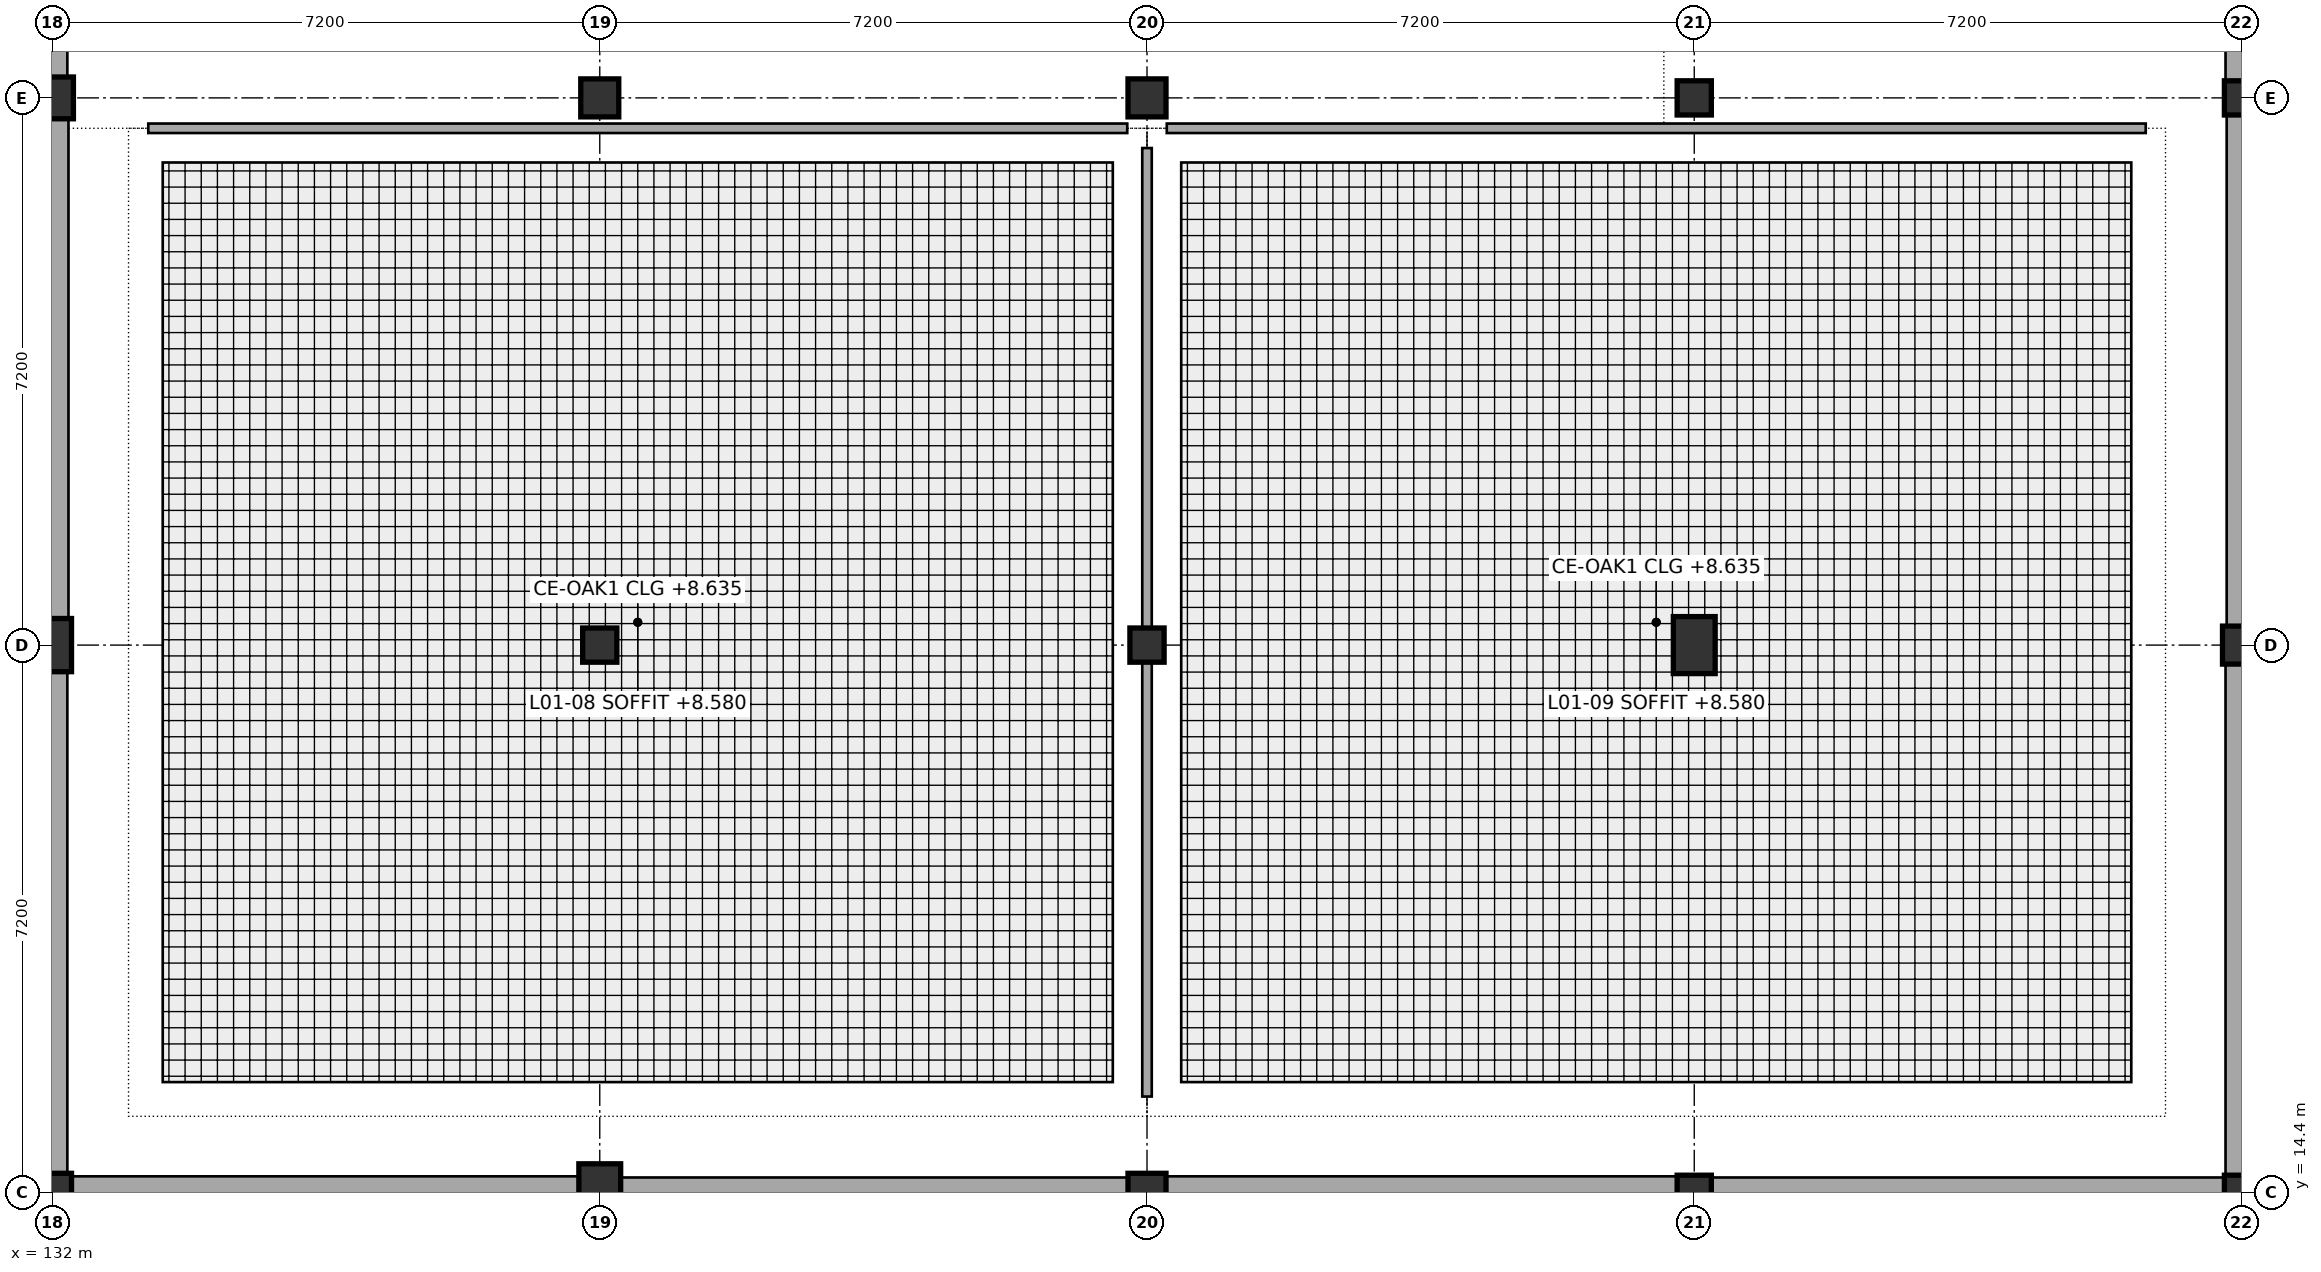
"""IFC4 building model, lengths in metres.
Left out: names, types, materials, properties, quantities, classifications, styles, units other than length and angle.
Written with IfcOpenShell. Run it as: python <this file> out.ifc"""

import sys

from ifc_helpers import new_model, si_unit, direction, frame, frame_2d, origin, origin_2d, place, context, subcontext, project, spatial, rectangle, circle, extrude, element, fill, save


model = new_model("IFC4")
c1 = context("Model", 3, precision=1e-05, world=origin(), true_north=direction((0.0, 1.0)))
c2 = subcontext(c1, "Body", "Model", "MODEL_VIEW")
j1 = project(units=[si_unit("LENGTHUNIT", "METRE"), si_unit("PLANEANGLEUNIT", "RADIAN")], contexts=[c1])
p1 = place(None, origin())
s1 = spatial("IfcSite", under=j1, at=p1, CompositionType="ELEMENT")
p2 = place(p1, origin())
s2 = spatial("IfcBuilding", under=s1, at=p2, CompositionType="ELEMENT")
p3 = place(p2, frame((0.0, 0.0, 4.8)))
s3 = spatial("IfcBuildingStorey", under=s2, at=p3, CompositionType="ELEMENT", Elevation=4.8)
p4 = place(p3, frame((132.0, 14.4, 0.0), z_axis=(0.0, 0.0, 1.0), x_axis=(1.0, 0.0, 0.0)))
e1 = element("IfcColumn", 1, at=p4, inside=s3, PredefinedType="COLUMN", context=c2, shape_type="SweptSolid", body=[
    extrude(rectangle(XDim=0.5, YDim=0.5, at=origin_2d()), origin(), (0.0, 0.0, 1.0), 4.2),
])
p5 = place(p3, frame((132.0, 21.6, 0.0), z_axis=(0.0, 0.0, 1.0), x_axis=(1.0, 0.0, 0.0)))
e2 = element("IfcColumn", 2, at=p5, inside=s3, PredefinedType="COLUMN", context=c2, shape_type="SweptSolid", body=[
    extrude(rectangle(XDim=0.5, YDim=0.7, at=origin_2d()), origin(), (0.0, 0.0, 1.0), 4.2),
])
p6 = place(p3, frame((132.0, 28.8, 0.0), z_axis=(0.0, 0.0, 1.0), x_axis=(1.0, 0.0, 0.0)))
e3 = element("IfcColumn", 3, at=p6, inside=s3, PredefinedType="COLUMN", context=c2, shape_type="SweptSolid", body=[
    extrude(circle(Radius=0.275, at=origin_2d()), origin(), (0.0, 0.0, 1.0), 4.2),
])
p7 = place(p3, frame((139.2, 14.4, 0.0), z_axis=(0.0, 0.0, 1.0), x_axis=(1.0, 0.0, 0.0)))
e4 = element("IfcColumn", 4, at=p7, inside=s3, PredefinedType="COLUMN", context=c2, shape_type="SweptSolid", body=[
    extrude(rectangle(XDim=0.55, YDim=0.75, at=origin_2d()), origin(), (0.0, 0.0, 1.0), 4.2),
])
p8 = place(p3, frame((139.2, 21.6, 0.0), z_axis=(0.0, 0.0, 1.0), x_axis=(1.0, 0.0, 0.0)))
e5 = element("IfcColumn", 5, at=p8, inside=s3, PredefinedType="COLUMN", context=c2, shape_type="SweptSolid", body=[
    extrude(rectangle(XDim=0.45, YDim=0.45, at=origin_2d()), origin(), (0.0, 0.0, 1.0), 4.2),
])
for number, where, z_axis, x_axis in (
    (6, (139.2, 28.8, 0.0), (0.0, 0.0, 1.0), (1.0, 0.0, 0.0)),
    (7, (146.4, 14.4, 0.0), (0.0, 0.0, 1.0), (1.0, 0.0, 0.0)),
):
    element("IfcColumn", number, at=place(p3, frame(where, z_axis=z_axis, x_axis=x_axis)), inside=s3, PredefinedType="COLUMN", context=c2, shape_type="SweptSolid", body=[
        extrude(rectangle(XDim=0.5, YDim=0.5, at=origin_2d()), origin(), (0.0, 0.0, 1.0), 4.2),
    ])
p9 = place(p3, frame((146.4, 21.6, 0.0), z_axis=(0.0, 0.0, 1.0), x_axis=(1.0, 0.0, 0.0)))
e8 = element("IfcColumn", 8, at=p9, inside=s3, PredefinedType="COLUMN", context=c2, shape_type="SweptSolid", body=[
    extrude(rectangle(XDim=0.45, YDim=0.45, at=origin_2d()), origin(), (0.0, 0.0, 1.0), 4.2),
])
p10 = place(p3, frame((146.4, 28.8, 0.0), z_axis=(0.0, 0.0, 1.0), x_axis=(1.0, 0.0, 0.0)))
e9 = element("IfcColumn", 9, at=p10, inside=s3, PredefinedType="COLUMN", context=c2, shape_type="SweptSolid", body=[
    extrude(rectangle(XDim=0.5, YDim=0.5, at=origin_2d()), origin(), (0.0, 0.0, 1.0), 4.2),
])
p11 = place(p3, frame((153.6, 14.4, 0.0), z_axis=(0.0, 0.0, 1.0), x_axis=(1.0, 0.0, 0.0)))
e10 = element("IfcColumn", 10, at=p11, inside=s3, PredefinedType="COLUMN", context=c2, shape_type="SweptSolid", body=[
    extrude(rectangle(XDim=0.45, YDim=0.45, at=origin_2d()), origin(), (0.0, 0.0, 1.0), 4.2),
])
p12 = place(p3, frame((153.6, 21.6, 0.0), z_axis=(0.0, 0.0, 1.0), x_axis=(1.0, 0.0, 0.0)))
e11 = element("IfcColumn", 11, at=p12, inside=s3, PredefinedType="COLUMN", context=c2, shape_type="SweptSolid", body=[
    extrude(rectangle(XDim=0.55, YDim=0.75, at=origin_2d()), origin(), (0.0, 0.0, 1.0), 4.2),
])
for number, where, z_axis, x_axis in (
    (12, (153.6, 28.8, 0.0), (0.0, 0.0, 1.0), (1.0, 0.0, 0.0)),
    (13, (160.8, 14.4, 0.0), (0.0, 0.0, 1.0), (1.0, 0.0, 0.0)),
):
    element("IfcColumn", number, at=place(p3, frame(where, z_axis=z_axis, x_axis=x_axis)), inside=s3, PredefinedType="COLUMN", context=c2, shape_type="SweptSolid", body=[
        extrude(rectangle(XDim=0.45, YDim=0.45, at=origin_2d()), origin(), (0.0, 0.0, 1.0), 4.2),
    ])
p13 = place(p3, frame((160.8, 21.6, 0.0), z_axis=(0.0, 0.0, 1.0), x_axis=(1.0, 0.0, 0.0)))
e14 = element("IfcColumn", 14, at=p13, inside=s3, PredefinedType="COLUMN", context=c2, shape_type="SweptSolid", body=[
    extrude(rectangle(XDim=0.5, YDim=0.5, at=origin_2d()), origin(), (0.0, 0.0, 1.0), 4.2),
])
p14 = place(p3, frame((160.8, 28.8, 0.0), z_axis=(0.0, 0.0, 1.0), x_axis=(1.0, 0.0, 0.0)))
e15 = element("IfcColumn", 15, at=p14, inside=s3, PredefinedType="COLUMN", context=c2, shape_type="SweptSolid", body=[
    extrude(rectangle(XDim=0.45, YDim=0.45, at=origin_2d()), origin(), (0.0, 0.0, 1.0), 4.2),
])
p15 = place(p3, frame((160.8, 36.0, 0.0), z_axis=(0.0, 0.0, 1.0), x_axis=(0.0, -1.0, 0.0)))
e16 = element("IfcWall", 16, at=p15, inside=s3, PredefinedType="STANDARD", context=c2, shape_type="SweptSolid", body=[
    extrude(rectangle(XDim=7.2, YDim=0.42, at=frame_2d((3.6, 0.0))), origin(), (0.0, 0.0, 1.0), 3.84),
])
p16 = place(p15, frame((3.0, 0.0, 0.8)))
e17 = element("IfcOpeningElement", 17, at=p16, cuts=e16, PredefinedType="OPENING", context=c2, shape_type="SweptSolid", body=[
    extrude(rectangle(XDim=1.2, YDim=1.45, at=frame_2d((0.6, 0.725))), frame((0.0, 0.22, 0.0), z_axis=(0.0, -1.0, 0.0), x_axis=(1.0, 0.0, 0.0)), (0.0, 0.0, 1.0), 0.44),
])
p17 = place(p3, frame((160.8, 28.8, 0.0), z_axis=(0.0, 0.0, 1.0), x_axis=(0.0, -1.0, 0.0)))
e18 = element("IfcWall", 18, at=p17, inside=s3, PredefinedType="STANDARD", context=c2, shape_type="SweptSolid", body=[
    extrude(rectangle(XDim=7.2, YDim=0.39, at=frame_2d((3.6, 0.0))), origin(), (0.0, 0.0, 1.0), 2.94),
])
p18 = place(p17, frame((2.85, 0.0, 0.8)))
e19 = element("IfcOpeningElement", 19, at=p18, cuts=e18, PredefinedType="OPENING", context=c2, shape_type="SweptSolid", body=[
    extrude(rectangle(XDim=1.5, YDim=1.45, at=frame_2d((0.75, 0.725))), frame((0.0, 0.205, 0.0), z_axis=(0.0, -1.0, 0.0), x_axis=(1.0, 0.0, 0.0)), (0.0, 0.0, 1.0), 0.41),
])
p19 = place(p3, frame((160.8, 21.6, 0.0), z_axis=(0.0, 0.0, 1.0), x_axis=(0.0, -1.0, 0.0)))
e20 = element("IfcWall", 20, at=p19, inside=s3, PredefinedType="STANDARD", context=c2, shape_type="SweptSolid", body=[
    extrude(rectangle(XDim=7.2, YDim=0.42, at=frame_2d((3.6, 0.0))), origin(), (0.0, 0.0, 1.0), 3.84),
])
p20 = place(p19, frame((2.7, 0.0, 0.8)))
e21 = element("IfcOpeningElement", 21, at=p20, cuts=e20, PredefinedType="OPENING", context=c2, shape_type="SweptSolid", body=[
    extrude(rectangle(XDim=1.8, YDim=1.45, at=frame_2d((0.9, 0.725))), frame((0.0, 0.22, 0.0), z_axis=(0.0, -1.0, 0.0), x_axis=(1.0, 0.0, 0.0)), (0.0, 0.0, 1.0), 0.44),
])
p21 = place(p3, frame((160.8, 14.4, 0.0), z_axis=(0.0, 0.0, 1.0), x_axis=(-1.0, 0.0, 0.0)))
e22 = element("IfcWall", 22, at=p21, inside=s3, PredefinedType="STANDARD", context=c2, shape_type="SweptSolid", body=[
    extrude(rectangle(XDim=7.2, YDim=0.39, at=frame_2d((3.6, 0.0))), origin(), (0.0, 0.0, 1.0), 3.04),
])
p22 = place(p21, frame((2.8, 0.0, 0.0)))
e23 = element("IfcOpeningElement", 23, at=p22, cuts=e22, PredefinedType="OPENING", context=c2, shape_type="SweptSolid", body=[
    extrude(rectangle(XDim=1.6, YDim=2.2, at=frame_2d((0.8, 1.1))), frame((0.0, 0.205, 0.0), z_axis=(0.0, -1.0, 0.0), x_axis=(1.0, 0.0, 0.0)), (0.0, 0.0, 1.0), 0.41),
])
p23 = place(p3, frame((153.6, 14.4, 0.0), z_axis=(0.0, 0.0, 1.0), x_axis=(-1.0, 0.0, 0.0)))
e24 = element("IfcWall", 24, at=p23, inside=s3, PredefinedType="STANDARD", context=c2, shape_type="SweptSolid", body=[
    extrude(rectangle(XDim=7.2, YDim=0.42, at=frame_2d((3.6, 0.0))), origin(), (0.0, 0.0, 1.0), 3.84),
])
p24 = place(p23, frame((2.55, 0.0, 0.8)))
e25 = element("IfcOpeningElement", 25, at=p24, cuts=e24, PredefinedType="OPENING", context=c2, shape_type="SweptSolid", body=[
    extrude(rectangle(XDim=2.1, YDim=1.45, at=frame_2d((1.05, 0.725))), frame((0.0, 0.22, 0.0), z_axis=(0.0, -1.0, 0.0), x_axis=(1.0, 0.0, 0.0)), (0.0, 0.0, 1.0), 0.44),
])
p25 = place(p3, frame((146.4, 14.4, 0.0), z_axis=(0.0, 0.0, 1.0), x_axis=(-1.0, 0.0, 0.0)))
e26 = element("IfcWall", 26, at=p25, inside=s3, PredefinedType="STANDARD", context=c2, shape_type="SweptSolid", body=[
    extrude(rectangle(XDim=7.2, YDim=0.39, at=frame_2d((3.6, 0.0))), origin(), (0.0, 0.0, 1.0), 3.09),
])
p26 = place(p25, frame((2.4, 0.0, 0.8)))
e27 = element("IfcOpeningElement", 27, at=p26, cuts=e26, PredefinedType="OPENING", context=c2, shape_type="SweptSolid", body=[
    extrude(rectangle(XDim=2.4, YDim=1.45, at=frame_2d((1.2, 0.725))), frame((0.0, 0.205, 0.0), z_axis=(0.0, -1.0, 0.0), x_axis=(1.0, 0.0, 0.0)), (0.0, 0.0, 1.0), 0.41),
])
p27 = place(p3, frame((139.2, 14.4, 0.0), z_axis=(0.0, 0.0, 1.0), x_axis=(-1.0, 0.0, 0.0)))
e28 = element("IfcWall", 28, at=p27, inside=s3, PredefinedType="STANDARD", context=c2, shape_type="SweptSolid", body=[
    extrude(rectangle(XDim=7.2, YDim=0.42, at=frame_2d((3.6, 0.0))), origin(), (0.0, 0.0, 1.0), 3.84),
])
p28 = place(p27, frame((2.2, 0.0, 0.8)))
e29 = element("IfcOpeningElement", 29, at=p28, cuts=e28, PredefinedType="OPENING", context=c2, shape_type="SweptSolid", body=[
    extrude(rectangle(XDim=2.8, YDim=1.6, at=frame_2d((1.4, 0.8))), frame((0.0, 0.22, 0.0), z_axis=(0.0, -1.0, 0.0), x_axis=(1.0, 0.0, 0.0)), (0.0, 0.0, 1.0), 0.44),
])
p29 = place(p3, frame((132.0, 14.4, 0.0), z_axis=(0.0, 0.0, 1.0), x_axis=(0.0, 1.0, 0.0)))
e30 = element("IfcWall", 30, at=p29, inside=s3, PredefinedType="STANDARD", context=c2, shape_type="SweptSolid", body=[
    extrude(rectangle(XDim=7.2, YDim=0.39, at=frame_2d((3.6, 0.0))), origin(), (0.0, 0.0, 1.0), 2.64),
])
p30 = place(p29, frame((2.0, 0.0, 0.8)))
e31 = element("IfcOpeningElement", 31, at=p30, cuts=e30, PredefinedType="OPENING", context=c2, shape_type="SweptSolid", body=[
    extrude(rectangle(XDim=3.2, YDim=1.6, at=frame_2d((1.6, 0.8))), frame((0.0, 0.205, 0.0), z_axis=(0.0, -1.0, 0.0), x_axis=(1.0, 0.0, 0.0)), (0.0, 0.0, 1.0), 0.41),
])
p31 = place(p3, frame((132.0, 21.6, 0.0), z_axis=(0.0, 0.0, 1.0), x_axis=(0.0, 1.0, 0.0)))
e32 = element("IfcWall", 32, at=p31, inside=s3, PredefinedType="STANDARD", context=c2, shape_type="SweptSolid", body=[
    extrude(rectangle(XDim=7.2, YDim=0.42, at=frame_2d((3.6, 0.0))), origin(), (0.0, 0.0, 1.0), 3.84),
])
p32 = place(p31, frame((1.8, 0.0, 0.8)))
e33 = element("IfcOpeningElement", 33, at=p32, cuts=e32, PredefinedType="OPENING", context=c2, shape_type="SweptSolid", body=[
    extrude(rectangle(XDim=3.6, YDim=1.6, at=frame_2d((1.8, 0.8))), frame((0.0, 0.22, 0.0), z_axis=(0.0, -1.0, 0.0), x_axis=(1.0, 0.0, 0.0)), (0.0, 0.0, 1.0), 0.44),
])
p33 = place(p3, frame((132.0, 28.8, 0.0), z_axis=(0.0, 0.0, 1.0), x_axis=(0.0, 1.0, 0.0)))
e34 = element("IfcWall", 34, at=p33, inside=s3, PredefinedType="STANDARD", context=c2, shape_type="SweptSolid", body=[
    extrude(rectangle(XDim=7.2, YDim=0.39, at=frame_2d((3.6, 0.0))), origin(), (0.0, 0.0, 1.0), 3.04),
])
p34 = place(p33, frame((3.0, 0.0, 0.8)))
e35 = element("IfcOpeningElement", 35, at=p34, cuts=e34, PredefinedType="OPENING", context=c2, shape_type="SweptSolid", body=[
    extrude(rectangle(XDim=1.2, YDim=1.65, at=frame_2d((0.6, 0.825))), frame((0.0, 0.205, 0.0), z_axis=(0.0, -1.0, 0.0), x_axis=(1.0, 0.0, 0.0)), (0.0, 0.0, 1.0), 0.41),
])
p35 = place(p3, frame((146.4, 15.66, 0.0), z_axis=(0.0, 0.0, 1.0), x_axis=(0.0, 1.0, 0.0)))
e36 = element("IfcWall", 36, at=p35, inside=s3, PredefinedType="PARTITIONING", context=c2, shape_type="SweptSolid", body=[
    extrude(rectangle(XDim=12.48, YDim=0.125, at=frame_2d((6.24, 0.0))), origin(), (0.0, 0.0, 1.0), 2.965),
])
p36 = place(p3, frame((146.14, 28.4, 0.0), z_axis=(0.0, 0.0, 1.0), x_axis=(-1.0, 0.0, 0.0)))
e37 = element("IfcWall", 37, at=p36, inside=s3, PredefinedType="PARTITIONING", context=c2, shape_type="SweptSolid", body=[
    extrude(rectangle(XDim=12.88, YDim=0.125, at=frame_2d((6.44, 0.0))), origin(), (0.0, 0.0, 1.0), 3.015),
])
p37 = place(p36, frame((5.04, 0.0, 0.0)))
e38 = element("IfcOpeningElement", 38, at=p37, cuts=e37, PredefinedType="OPENING", context=c2, shape_type="SweptSolid", body=[
    extrude(rectangle(XDim=1.2, YDim=2.15, at=frame_2d((0.6, 1.075))), frame((0.0, 0.073, 0.0), z_axis=(0.0, -1.0, 0.0), x_axis=(1.0, 0.0, 0.0)), (0.0, 0.0, 1.0), 0.145),
])
p38 = place(p3, frame((159.54, 28.4, 0.0), z_axis=(0.0, 0.0, 1.0), x_axis=(-1.0, 0.0, 0.0)))
e39 = element("IfcWall", 39, at=p38, inside=s3, PredefinedType="PARTITIONING", context=c2, shape_type="SweptSolid", body=[
    extrude(rectangle(XDim=12.88, YDim=0.125, at=frame_2d((6.44, 0.0))), origin(), (0.0, 0.0, 1.0), 2.915),
])
p39 = place(p38, frame((6.64, 0.0, 0.0)))
e40 = element("IfcOpeningElement", 40, at=p39, cuts=e39, PredefinedType="OPENING", context=c2, shape_type="SweptSolid", body=[
    extrude(rectangle(XDim=1.2, YDim=2.15, at=frame_2d((0.6, 1.075))), frame((0.0, 0.073, 0.0), z_axis=(0.0, -1.0, 0.0), x_axis=(1.0, 0.0, 0.0)), (0.0, 0.0, 1.0), 0.145),
])
p40 = place(p22, frame((1.6, 0.0, 0.0), z_axis=(0.0, 0.0, 1.0), x_axis=(-1.0, 0.0, 0.0)))
e41 = element("IfcDoor", 41, at=p40, inside=s3, OperationType="DOUBLE_DOOR_SINGLE_SWING", PredefinedType="DOOR", context=c2, shape_type="SweptSolid", body=[
    extrude(rectangle(XDim=1.6, YDim=2.2, at=frame_2d((0.8, 1.1))), frame((0.0, 0.025, 0.0), z_axis=(0.0, -1.0, 0.0), x_axis=(1.0, 0.0, 0.0)), (0.0, 0.0, 1.0), 0.05),
])
fill(e23, e41)
p41 = place(p18, origin())
e42 = element("IfcWindow", 42, at=p41, inside=s3, PartitioningType="SINGLE_PANEL", PredefinedType="WINDOW", context=c2, shape_type="SweptSolid", body=[
    extrude(rectangle(XDim=1.5, YDim=1.45, at=frame_2d((0.75, 0.725))), frame((0.0, 0.03, 0.0), z_axis=(0.0, -1.0, 0.0), x_axis=(1.0, 0.0, 0.0)), (0.0, 0.0, 1.0), 0.06),
])
fill(e19, e42)
p42 = place(p20, origin())
e43 = element("IfcWindow", 43, at=p42, inside=s3, PartitioningType="SINGLE_PANEL", PredefinedType="WINDOW", context=c2, shape_type="SweptSolid", body=[
    extrude(rectangle(XDim=1.8, YDim=1.45, at=frame_2d((0.9, 0.725))), frame((0.0, 0.03, 0.0), z_axis=(0.0, -1.0, 0.0), x_axis=(1.0, 0.0, 0.0)), (0.0, 0.0, 1.0), 0.06),
])
fill(e21, e43)
p43 = place(p24, origin())
e44 = element("IfcWindow", 44, at=p43, inside=s3, PartitioningType="SINGLE_PANEL", PredefinedType="WINDOW", context=c2, shape_type="SweptSolid", body=[
    extrude(rectangle(XDim=2.1, YDim=1.45, at=frame_2d((1.05, 0.725))), frame((0.0, 0.03, 0.0), z_axis=(0.0, -1.0, 0.0), x_axis=(1.0, 0.0, 0.0)), (0.0, 0.0, 1.0), 0.06),
])
fill(e25, e44)
p44 = place(p26, origin())
e45 = element("IfcWindow", 45, at=p44, inside=s3, PartitioningType="TRIPLE_PANEL_VERTICAL", PredefinedType="WINDOW", context=c2, shape_type="SweptSolid", body=[
    extrude(rectangle(XDim=2.4, YDim=1.45, at=frame_2d((1.2, 0.725))), frame((0.0, 0.03, 0.0), z_axis=(0.0, -1.0, 0.0), x_axis=(1.0, 0.0, 0.0)), (0.0, 0.0, 1.0), 0.06),
])
fill(e27, e45)
p45 = place(p28, origin())
e46 = element("IfcWindow", 46, at=p45, inside=s3, PartitioningType="TRIPLE_PANEL_VERTICAL", PredefinedType="WINDOW", context=c2, shape_type="SweptSolid", body=[
    extrude(rectangle(XDim=2.8, YDim=1.6, at=frame_2d((1.4, 0.8))), frame((0.0, 0.03, 0.0), z_axis=(0.0, -1.0, 0.0), x_axis=(1.0, 0.0, 0.0)), (0.0, 0.0, 1.0), 0.06),
])
fill(e29, e46)
p46 = place(p30, origin())
e47 = element("IfcWindow", 47, at=p46, inside=s3, PartitioningType="TRIPLE_PANEL_VERTICAL", PredefinedType="WINDOW", context=c2, shape_type="SweptSolid", body=[
    extrude(rectangle(XDim=3.2, YDim=1.6, at=frame_2d((1.6, 0.8))), frame((0.0, 0.03, 0.0), z_axis=(0.0, -1.0, 0.0), x_axis=(1.0, 0.0, 0.0)), (0.0, 0.0, 1.0), 0.06),
])
fill(e31, e47)
p47 = place(p32, origin())
e48 = element("IfcWindow", 48, at=p47, inside=s3, PartitioningType="TRIPLE_PANEL_VERTICAL", PredefinedType="WINDOW", context=c2, shape_type="SweptSolid", body=[
    extrude(rectangle(XDim=3.6, YDim=1.6, at=frame_2d((1.8, 0.8))), frame((0.0, 0.03, 0.0), z_axis=(0.0, -1.0, 0.0), x_axis=(1.0, 0.0, 0.0)), (0.0, 0.0, 1.0), 0.06),
])
fill(e33, e48)
p48 = place(p37, origin())
e49 = element("IfcDoor", 49, at=p48, inside=s3, OperationType="SINGLE_SWING_RIGHT", PredefinedType="DOOR", context=c2, shape_type="SweptSolid", body=[
    extrude(rectangle(XDim=1.2, YDim=2.15, at=frame_2d((0.6, 1.075))), frame((0.0, 0.025, 0.0), z_axis=(0.0, -1.0, 0.0), x_axis=(1.0, 0.0, 0.0)), (0.0, 0.0, 1.0), 0.05),
])
fill(e38, e49)
p49 = place(p39, origin())
e50 = element("IfcDoor", 50, at=p49, inside=s3, OperationType="SINGLE_SWING_LEFT", PredefinedType="DOOR", context=c2, shape_type="SweptSolid", body=[
    extrude(rectangle(XDim=1.2, YDim=2.15, at=frame_2d((0.6, 1.075))), frame((0.0, 0.025, 0.0), z_axis=(0.0, -1.0, 0.0), x_axis=(1.0, 0.0, 0.0)), (0.0, 0.0, 1.0), 0.05),
])
fill(e40, e50)
save(model, sys.argv[1])
